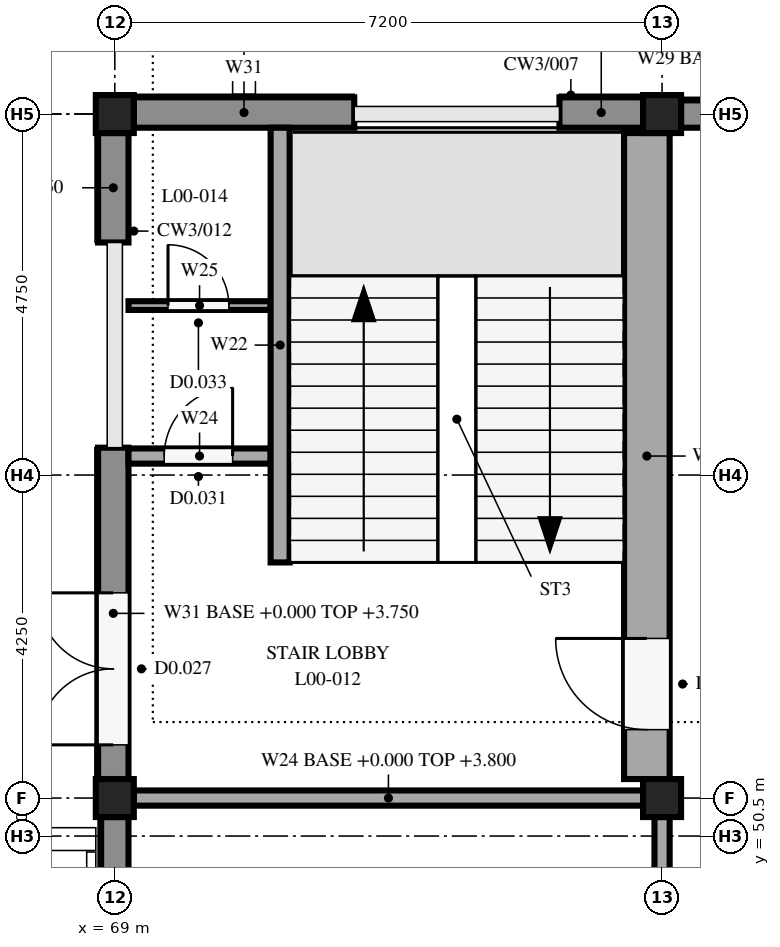
"""IFC4 building model, lengths in metres.
Left out: names, types, materials, properties, quantities, classifications, styles, units other than length and angle.
Written with IfcOpenShell. Run it as: python <this file> out.ifc"""

import sys

from ifc_helpers import new_model, si_unit, direction, frame, frame_2d, origin, origin_2d, place, context, subcontext, project, spatial, rectangle, extrude, element, fill, save


model = new_model("IFC4")
c1 = context("Model", 3, precision=1e-05, world=origin(), true_north=direction((0.0, 1.0)))
c2 = subcontext(c1, "Body", "Model", "MODEL_VIEW")
j1 = project(units=[si_unit("LENGTHUNIT", "METRE"), si_unit("PLANEANGLEUNIT", "RADIAN")], contexts=[c1])
p1 = place(None, origin())
s1 = spatial("IfcSite", under=j1, at=p1, CompositionType="ELEMENT")
p2 = place(p1, origin())
s2 = spatial("IfcBuilding", under=s1, at=p2, CompositionType="ELEMENT")
p3 = place(p2, origin())
s3 = spatial("IfcBuildingStorey", under=s2, at=p3, CompositionType="ELEMENT", Elevation=0.0)
for number, where, z_axis, x_axis in (
    (1, (69.0, 51.0, 0.0), (0.0, 0.0, 1.0), (1.0, 0.0, 0.0)),
    (2, (69.0, 60.0, 0.0), (0.0, 0.0, 1.0), (1.0, 0.0, 0.0)),
    (3, (76.2, 51.0, 0.0), (0.0, 0.0, 1.0), (1.0, 0.0, 0.0)),
    (4, (76.2, 60.0, 0.0), (0.0, 0.0, 1.0), (1.0, 0.0, 0.0)),
):
    element("IfcColumn", number, at=place(p3, frame(where, z_axis=z_axis, x_axis=x_axis)), inside=s3, PredefinedType="COLUMN", context=c2, shape_type="SweptSolid", body=[
        extrude(rectangle(XDim=0.5, YDim=0.5, at=origin_2d()), origin(), (0.0, 0.0, 1.0), 4.25),
    ])
p4 = place(p3, frame((69.0, 42.25, 0.0), z_axis=(0.0, 0.0, 1.0), x_axis=(0.0, 1.0, 0.0)))
e5 = element("IfcWall", 5, at=p4, inside=s3, PredefinedType="STANDARD", context=c2, shape_type="SweptSolid", body=[
    extrude(rectangle(XDim=8.5, YDim=0.36, at=frame_2d((4.25, 0.0))), origin(), (0.0, 0.0, 1.0), 3.75),
])
p5 = place(p4, frame((0.58, 0.0, 2.2)))
e6 = element("IfcOpeningElement", 6, at=p5, cuts=e5, PredefinedType="OPENING", context=c2, shape_type="SweptSolid", body=[
    extrude(rectangle(XDim=1.4, YDim=1.2, at=frame_2d((0.7, 0.6))), frame((0.0, 0.19, 0.0), z_axis=(0.0, -1.0, 0.0), x_axis=(1.0, 0.0, 0.0)), (0.0, 0.0, 1.0), 0.38),
])
p6 = place(p4, frame((2.56, 0.0, 2.2)))
e7 = element("IfcOpeningElement", 7, at=p6, cuts=e5, PredefinedType="OPENING", context=c2, shape_type="SweptSolid", body=[
    extrude(rectangle(XDim=1.4, YDim=1.2, at=frame_2d((0.7, 0.6))), frame((0.0, 0.19, 0.0), z_axis=(0.0, -1.0, 0.0), x_axis=(1.0, 0.0, 0.0)), (0.0, 0.0, 1.0), 0.38),
])
p7 = place(p4, frame((5.925, 0.0, 0.0)))
e8 = element("IfcOpeningElement", 8, at=p7, cuts=e5, PredefinedType="OPENING", context=c2, shape_type="SweptSolid", body=[
    extrude(rectangle(XDim=1.2, YDim=2.1, at=frame_2d((0.6, 1.05))), frame((0.0, 0.19, 0.0), z_axis=(0.0, -1.0, 0.0), x_axis=(1.0, 0.0, 0.0)), (0.0, 0.0, 1.0), 0.38),
])
p8 = place(p3, frame((68.98, 51.25, 0.0), z_axis=(0.0, 0.0, 1.0), x_axis=(0.0, 1.0, 0.0)))
e9 = element("IfcWall", 9, at=p8, inside=s3, PredefinedType="STANDARD", context=c2, shape_type="SweptSolid", body=[
    extrude(rectangle(XDim=4.36, YDim=0.4, at=frame_2d((2.18, 0.0))), origin(), (0.0, 0.0, 1.0), 3.75),
])
p9 = place(p8, frame((0.45, 0.0, 0.0)))
e10 = element("IfcOpeningElement", 10, at=p9, cuts=e9, PredefinedType="OPENING", context=c2, shape_type="SweptSolid", body=[
    extrude(rectangle(XDim=2.0, YDim=2.2, at=frame_2d((1.0, 1.1))), frame((0.0, 0.21, 0.0), z_axis=(0.0, -1.0, 0.0), x_axis=(1.0, 0.0, 0.0)), (0.0, 0.0, 1.0), 0.42),
])
p10 = place(p3, frame((68.98, 58.31, 0.0), z_axis=(0.0, 0.0, 1.0), x_axis=(0.0, 1.0, 0.0)))
e11 = element("IfcWall", 11, at=p10, inside=s3, PredefinedType="STANDARD", context=c2, shape_type="SweptSolid", body=[
    extrude(rectangle(XDim=1.44, YDim=0.4, at=frame_2d((0.72, 0.0))), origin(), (0.0, 0.0, 1.0), 3.75),
])
p11 = place(p3, frame((69.25, 60.02, 0.0), z_axis=(0.0, 0.0, 1.0), x_axis=(1.0, 0.0, 0.0)))
e12 = element("IfcWall", 12, at=p11, inside=s3, PredefinedType="STANDARD", context=c2, shape_type="SweptSolid", body=[
    extrude(rectangle(XDim=2.9, YDim=0.4, at=frame_2d((1.45, 0.0))), origin(), (0.0, 0.0, 1.0), 3.8),
])
p12 = place(p3, frame((74.85, 60.02, 0.0), z_axis=(0.0, 0.0, 1.0), x_axis=(1.0, 0.0, 0.0)))
e13 = element("IfcWall", 13, at=p12, inside=s3, PredefinedType="STANDARD", context=c2, shape_type="SweptSolid", body=[
    extrude(rectangle(XDim=1.1, YDim=0.4, at=frame_2d((0.55, 0.0))), origin(), (0.0, 0.0, 1.0), 3.8),
])
p13 = place(p3, frame((76.45, 60.0, 0.0), z_axis=(0.0, 0.0, 1.0), x_axis=(1.0, 0.0, 0.0)))
e14 = element("IfcWall", 14, at=p13, inside=s3, PredefinedType="STANDARD", context=c2, shape_type="SweptSolid", body=[
    extrude(rectangle(XDim=2.2, YDim=0.36, at=frame_2d((1.1, 0.0))), origin(), (0.0, 0.0, 1.0), 3.9),
])
p14 = place(p13, frame((0.3, 0.0, 0.0)))
e15 = element("IfcOpeningElement", 15, at=p14, cuts=e14, PredefinedType="OPENING", context=c2, shape_type="SweptSolid", body=[
    extrude(rectangle(XDim=1.6, YDim=2.1, at=frame_2d((0.8, 1.05))), frame((0.0, 0.19, 0.0), z_axis=(0.0, -1.0, 0.0), x_axis=(1.0, 0.0, 0.0)), (0.0, 0.0, 1.0), 0.38),
])
p15 = place(p3, frame((71.175, 54.1, 0.0), z_axis=(0.0, 0.0, 1.0), x_axis=(0.0, 1.0, 0.0)))
e16 = element("IfcWall", 16, at=p15, inside=s3, PredefinedType="SOLIDWALL", context=c2, shape_type="SweptSolid", body=[
    extrude(rectangle(XDim=5.72, YDim=0.25, at=frame_2d((2.86, 0.0))), origin(), (0.0, 0.0, 1.0), 4.25),
])
p16 = place(p3, frame((76.0, 51.25, 0.0), z_axis=(0.0, 0.0, 1.0), x_axis=(0.0, 1.0, 0.0)))
e17 = element("IfcWall", 17, at=p16, inside=s3, PredefinedType="SOLIDWALL", context=c2, shape_type="SweptSolid", body=[
    extrude(rectangle(XDim=8.5, YDim=0.6, at=frame_2d((4.25, 0.0))), origin(), (0.0, 0.0, 1.0), 4.25),
])
p17 = place(p16, frame((0.65, 0.0, 0.0)))
e18 = element("IfcOpeningElement", 18, at=p17, cuts=e17, PredefinedType="OPENING", context=c2, shape_type="SweptSolid", body=[
    extrude(rectangle(XDim=1.2, YDim=2.1, at=frame_2d((0.6, 1.05))), frame((0.0, 0.31, 0.0), z_axis=(0.0, -1.0, 0.0), x_axis=(1.0, 0.0, 0.0)), (0.0, 0.0, 1.0), 0.62),
])
p18 = place(p3, frame((69.18, 55.5, 0.0), z_axis=(0.0, 0.0, 1.0), x_axis=(1.0, 0.0, 0.0)))
e19 = element("IfcWall", 19, at=p18, inside=s3, PredefinedType="SOLIDWALL", context=c2, shape_type="SweptSolid", body=[
    extrude(rectangle(XDim=1.87, YDim=0.2, at=frame_2d((0.935, 0.0))), origin(), (0.0, 0.0, 1.0), 4.25),
])
p19 = place(p18, frame((0.47, 0.0, 0.0)))
e20 = element("IfcOpeningElement", 20, at=p19, cuts=e19, PredefinedType="OPENING", context=c2, shape_type="SweptSolid", body=[
    extrude(rectangle(XDim=0.9, YDim=2.1, at=frame_2d((0.45, 1.05))), frame((0.0, 0.11, 0.0), z_axis=(0.0, -1.0, 0.0), x_axis=(1.0, 0.0, 0.0)), (0.0, 0.0, 1.0), 0.22),
])
p20 = place(p3, frame((69.18, 57.48, 0.0), z_axis=(0.0, 0.0, 1.0), x_axis=(1.0, 0.0, 0.0)))
e21 = element("IfcWall", 21, at=p20, inside=s3, PredefinedType="PARTITIONING", context=c2, shape_type="SweptSolid", body=[
    extrude(rectangle(XDim=1.87, YDim=0.115, at=frame_2d((0.935, 0.0))), origin(), (0.0, 0.0, 1.0), 4.25),
])
p21 = place(p20, frame((0.52, 0.0, 0.0)))
e22 = element("IfcOpeningElement", 22, at=p21, cuts=e21, PredefinedType="OPENING", context=c2, shape_type="SweptSolid", body=[
    extrude(rectangle(XDim=0.8, YDim=2.1, at=frame_2d((0.4, 1.05))), frame((0.0, 0.067, 0.0), z_axis=(0.0, -1.0, 0.0), x_axis=(1.0, 0.0, 0.0)), (0.0, 0.0, 1.0), 0.135),
])
p22 = place(p3, frame((69.25, 51.0, 0.0), z_axis=(0.0, 0.0, 1.0), x_axis=(1.0, 0.0, 0.0)))
e23 = element("IfcWall", 23, at=p22, inside=s3, PredefinedType="SOLIDWALL", context=c2, shape_type="SweptSolid", body=[
    extrude(rectangle(XDim=6.7, YDim=0.2, at=frame_2d((3.35, 0.0))), origin(), (0.0, 0.0, 1.0), 3.8),
])
p23 = place(p3, frame((76.2, 42.25, 0.0), z_axis=(0.0, 0.0, 1.0), x_axis=(0.0, 1.0, 0.0)))
e24 = element("IfcWall", 24, at=p23, inside=s3, PredefinedType="PARTITIONING", context=c2, shape_type="SweptSolid", body=[
    extrude(rectangle(XDim=8.5, YDim=0.2, at=frame_2d((4.25, 0.0))), origin(), (0.0, 0.0, 1.0), 3.8),
])
p24 = place(p23, frame((1.45, 0.0, 0.0)))
e25 = element("IfcOpeningElement", 25, at=p24, cuts=e24, PredefinedType="OPENING", context=c2, shape_type="SweptSolid", body=[
    extrude(rectangle(XDim=1.2, YDim=2.1, at=frame_2d((0.6, 1.05))), frame((0.0, 0.11, 0.0), z_axis=(0.0, -1.0, 0.0), x_axis=(1.0, 0.0, 0.0)), (0.0, 0.0, 1.0), 0.22),
])
p25 = place(p23, frame((6.0, 0.0, 0.0)))
e26 = element("IfcOpeningElement", 26, at=p25, cuts=e24, PredefinedType="OPENING", context=c2, shape_type="SweptSolid", body=[
    extrude(rectangle(XDim=0.9, YDim=2.1, at=frame_2d((0.45, 1.05))), frame((0.0, 0.11, 0.0), z_axis=(0.0, -1.0, 0.0), x_axis=(1.0, 0.0, 0.0)), (0.0, 0.0, 1.0), 0.22),
])
p26 = place(p9, origin())
e27 = element("IfcDoor", 27, at=p26, inside=s3, OperationType="DOUBLE_DOOR_SINGLE_SWING", PredefinedType="DOOR", context=c2, shape_type="SweptSolid", body=[
    extrude(rectangle(XDim=2.0, YDim=2.2, at=frame_2d((1.0, 1.1))), frame((0.0, 0.025, 0.0), z_axis=(0.0, -1.0, 0.0), x_axis=(1.0, 0.0, 0.0)), (0.0, 0.0, 1.0), 0.05),
])
fill(e10, e27)
p27 = place(p17, origin())
e28 = element("IfcDoor", 28, at=p27, inside=s3, OperationType="SINGLE_SWING_RIGHT", PredefinedType="DOOR", context=c2, shape_type="SweptSolid", body=[
    extrude(rectangle(XDim=1.2, YDim=2.1, at=frame_2d((0.6, 1.05))), frame((0.0, 0.025, 0.0), z_axis=(0.0, -1.0, 0.0), x_axis=(1.0, 0.0, 0.0)), (0.0, 0.0, 1.0), 0.05),
])
fill(e18, e28)
p28 = place(p19, origin())
e29 = element("IfcDoor", 29, at=p28, inside=s3, OperationType="SINGLE_SWING_RIGHT", PredefinedType="DOOR", context=c2, shape_type="SweptSolid", body=[
    extrude(rectangle(XDim=0.9, YDim=2.1, at=frame_2d((0.45, 1.05))), frame((0.0, 0.025, 0.0), z_axis=(0.0, -1.0, 0.0), x_axis=(1.0, 0.0, 0.0)), (0.0, 0.0, 1.0), 0.05),
])
fill(e20, e29)
p29 = place(p21, origin())
e30 = element("IfcDoor", 30, at=p29, inside=s3, OperationType="SINGLE_SWING_LEFT", PredefinedType="DOOR", context=c2, shape_type="SweptSolid", body=[
    extrude(rectangle(XDim=0.8, YDim=2.1, at=frame_2d((0.4, 1.05))), frame((0.0, 0.025, 0.0), z_axis=(0.0, -1.0, 0.0), x_axis=(1.0, 0.0, 0.0)), (0.0, 0.0, 1.0), 0.05),
])
fill(e22, e30)
save(model, sys.argv[1])
